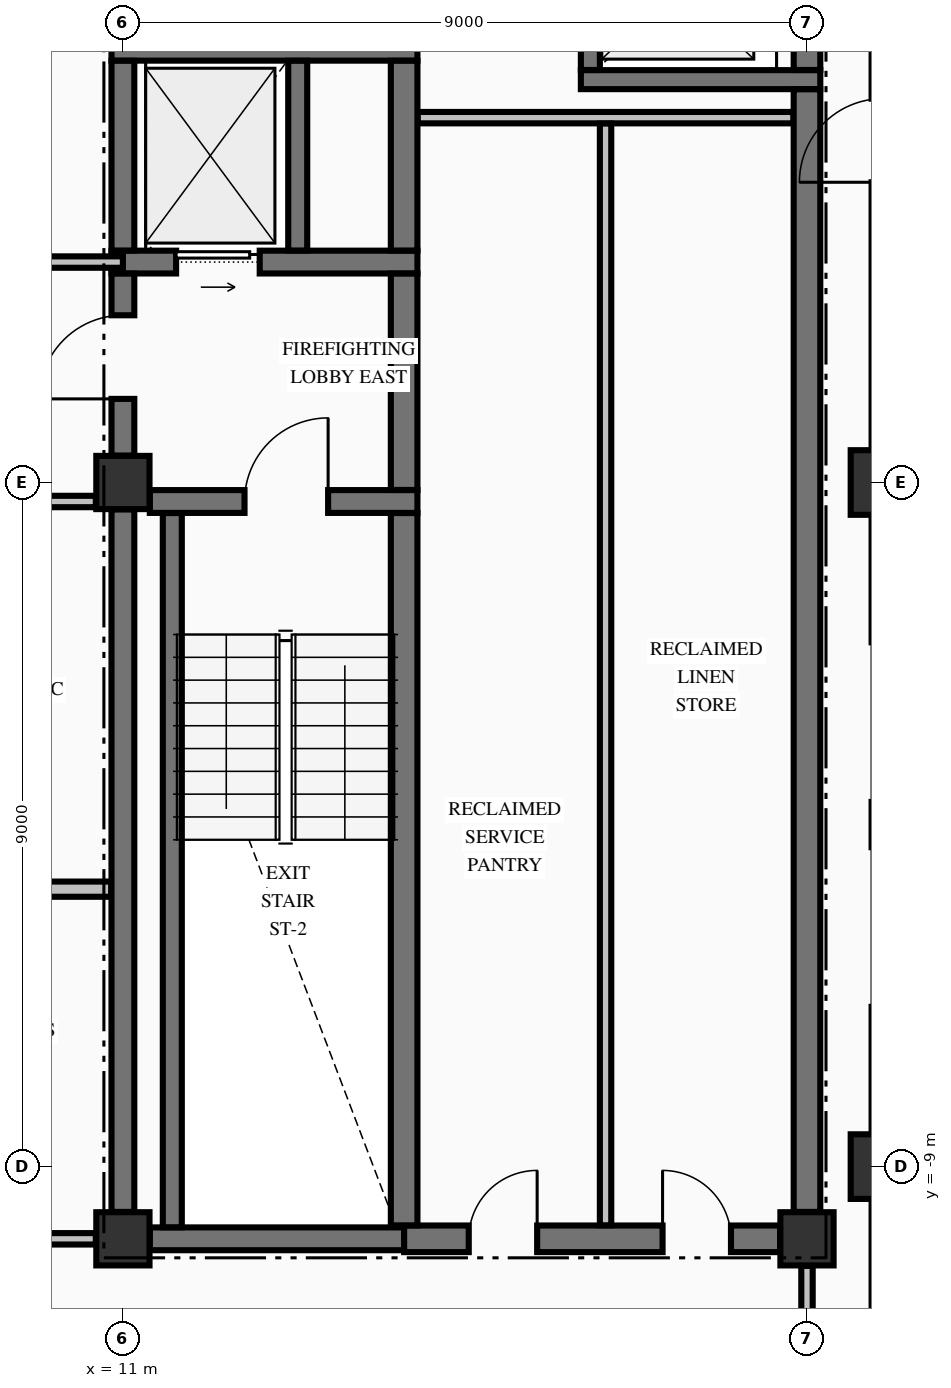
"""IFC4 building model, lengths in metres.
Left out: names, types, materials, properties, quantities, classifications, styles, units other than length and angle.
Written with IfcOpenShell. Run it as: python <this file> out.ifc"""

import sys

from ifc_helpers import new_model, si_unit, direction, frame, frame_2d, origin, origin_2d, place, context, subcontext, project, spatial, rectangle, extrude, element, fill, save


model = new_model("IFC4")
c1 = context("Model", 3, precision=1e-05, world=origin(), true_north=direction((0.0, 1.0)))
c2 = subcontext(c1, "Body", "Model", "MODEL_VIEW")
j1 = project(units=[si_unit("LENGTHUNIT", "METRE"), si_unit("PLANEANGLEUNIT", "RADIAN")], contexts=[c1])
p1 = place(None, origin())
s1 = spatial("IfcSite", under=j1, at=p1, CompositionType="ELEMENT")
p2 = place(p1, origin())
s2 = spatial("IfcBuilding", under=s1, at=p2, CompositionType="ELEMENT")
p3 = place(p2, frame((0.0, 0.0, 254.43)))
s3 = spatial("IfcBuildingStorey", under=s2, at=p3, CompositionType="ELEMENT", Elevation=254.43)
for number, where, z_axis, x_axis in (
    (1, (21.0, -9.0, -0.425), (0.0, 0.0, 1.0), (1.0, 0.0, 0.0)),
    (2, (21.0, 0.0, -0.425), (0.0, 0.0, 1.0), (1.0, 0.0, 0.0)),
):
    element("IfcColumn", number, at=place(p3, frame(where, z_axis=z_axis, x_axis=x_axis)), inside=s3, PredefinedType="COLUMN", context=c2, shape_type="SweptSolid", body=[
        extrude(rectangle(XDim=0.85, YDim=0.85, at=origin_2d()), origin(), (0.0, 0.0, 1.0), 3.405),
    ])
for number, where, z_axis, x_axis in (
    (3, (11.0, -9.95, -0.425), (0.0, 0.0, 1.0), (1.0, 0.0, 0.0)),
    (4, (11.0, 0.0, -0.425), (0.0, 0.0, 1.0), (1.0, 0.0, 0.0)),
    (5, (20.0, -9.95, -0.425), (0.0, 0.0, 1.0), (1.0, 0.0, 0.0)),
):
    element("IfcColumn", number, at=place(p3, frame(where, z_axis=z_axis, x_axis=x_axis)), inside=s3, PredefinedType="COLUMN", context=c2, shape_type="SweptSolid", body=[
        extrude(rectangle(XDim=0.7, YDim=0.7, at=origin_2d()), origin(), (0.0, 0.0, 1.0), 3.405),
    ])
p4 = place(p3, frame((21.0, -17.545, 0.0), z_axis=(0.0, 0.0, 1.0), x_axis=(0.0, 1.0, 0.0)))
e6 = element("IfcWall", 6, at=p4, inside=s3, PredefinedType="STANDARD", context=c2, shape_type="SweptSolid", body=[
    extrude(rectangle(XDim=8.09, YDim=0.3, at=frame_2d((4.045, 0.0))), origin(), (0.0, 0.0, 1.0), 2.372),
])
p5 = place(p3, frame((21.0, -8.545, 0.0), z_axis=(0.0, 0.0, 1.0), x_axis=(0.0, 1.0, 0.0)))
e7 = element("IfcWall", 7, at=p5, inside=s3, PredefinedType="STANDARD", context=c2, shape_type="SweptSolid", body=[
    extrude(rectangle(XDim=8.09, YDim=0.3, at=frame_2d((4.045, 0.0))), origin(), (0.0, 0.0, 1.0), 2.372),
])
p6 = place(p5, frame((1.647, 0.0, 0.7)))
e8 = element("IfcOpeningElement", 8, at=p6, cuts=e7, PredefinedType="OPENING", context=c2, shape_type="SweptSolid", body=[
    extrude(rectangle(XDim=2.1, YDim=1.5, at=frame_2d((1.05, 0.75))), frame((0.0, 0.16, 0.0), z_axis=(0.0, -1.0, 0.0), x_axis=(1.0, 0.0, 0.0)), (0.0, 0.0, 1.0), 0.32),
])
p7 = place(p5, frame((4.343, 0.0, 0.7)))
e9 = element("IfcOpeningElement", 9, at=p7, cuts=e7, PredefinedType="OPENING", context=c2, shape_type="SweptSolid", body=[
    extrude(rectangle(XDim=2.1, YDim=1.5, at=frame_2d((1.05, 0.75))), frame((0.0, 0.16, 0.0), z_axis=(0.0, -1.0, 0.0), x_axis=(1.0, 0.0, 0.0)), (0.0, 0.0, 1.0), 0.32),
])
p8 = place(p3, frame((21.0, 0.455, 0.0), z_axis=(0.0, 0.0, 1.0), x_axis=(0.0, 1.0, 0.0)))
e10 = element("IfcWall", 10, at=p8, inside=s3, PredefinedType="STANDARD", context=c2, shape_type="SweptSolid", body=[
    extrude(rectangle(XDim=8.09, YDim=0.3, at=frame_2d((4.045, 0.0))), origin(), (0.0, 0.0, 1.0), 2.372),
])
p9 = place(p8, frame((3.495, 0.0, 0.0)))
e11 = element("IfcOpeningElement", 11, at=p9, cuts=e10, PredefinedType="OPENING", context=c2, shape_type="SweptSolid", body=[
    extrude(rectangle(XDim=1.1, YDim=2.15, at=frame_2d((0.55, 1.075))), frame((0.0, 0.16, 0.0), z_axis=(0.0, -1.0, 0.0), x_axis=(1.0, 0.0, 0.0)), (0.0, 0.0, 1.0), 0.32),
])
p10 = place(p3, frame((11.354, -9.95, 0.0), z_axis=(0.0, 0.0, 1.0), x_axis=(1.0, 0.0, 0.0)))
e12 = element("IfcWall", 12, at=p10, inside=s3, PredefinedType="SHEAR", context=c2, shape_type="SweptSolid", body=[
    extrude(rectangle(XDim=3.346, YDim=0.3, at=frame_2d((1.673, 0.0))), origin(), (0.0, 0.0, 1.0), 2.98),
])
p11 = place(p3, frame((14.7, -9.95, 0.0), z_axis=(0.0, 0.0, 1.0), x_axis=(1.0, 0.0, 0.0)))
e13 = element("IfcWall", 13, at=p11, inside=s3, PredefinedType="SHEAR", context=c2, shape_type="SweptSolid", body=[
    extrude(rectangle(XDim=4.946, YDim=0.35, at=frame_2d((2.473, 0.0))), origin(), (0.0, 0.0, 1.0), 2.98),
])
p12 = place(p11, frame((0.85, 0.0, 0.0)))
e14 = element("IfcOpeningElement", 14, at=p12, cuts=e13, PredefinedType="OPENING", context=c2, shape_type="SweptSolid", body=[
    extrude(rectangle(XDim=0.9, YDim=2.15, at=frame_2d((0.45, 1.075))), frame((0.0, 0.185, 0.0), z_axis=(0.0, -1.0, 0.0), x_axis=(1.0, 0.0, 0.0)), (0.0, 0.0, 1.0), 0.37),
])
p13 = place(p11, frame((3.4, 0.0, 0.0)))
e15 = element("IfcOpeningElement", 15, at=p13, cuts=e13, PredefinedType="OPENING", context=c2, shape_type="SweptSolid", body=[
    extrude(rectangle(XDim=0.9, YDim=2.15, at=frame_2d((0.45, 1.075))), frame((0.0, 0.185, 0.0), z_axis=(0.0, -1.0, 0.0), x_axis=(1.0, 0.0, 0.0)), (0.0, 0.0, 1.0), 0.37),
])
p14 = place(p3, frame((11.354, -0.25, 0.0), z_axis=(0.0, 0.0, 1.0), x_axis=(1.0, 0.0, 0.0)))
e16 = element("IfcWall", 16, at=p14, inside=s3, PredefinedType="SHEAR", context=c2, shape_type="SweptSolid", body=[
    extrude(rectangle(XDim=3.521, YDim=0.3, at=frame_2d((1.76, 0.0))), origin(), (0.0, 0.0, 1.0), 2.98),
])
p15 = place(p14, frame((1.246, 0.0, 0.0)))
e17 = element("IfcOpeningElement", 17, at=p15, cuts=e16, PredefinedType="OPENING", context=c2, shape_type="SweptSolid", body=[
    extrude(rectangle(XDim=1.1, YDim=2.15, at=frame_2d((0.55, 1.075))), frame((0.0, 0.16, 0.0), z_axis=(0.0, -1.0, 0.0), x_axis=(1.0, 0.0, 0.0)), (0.0, 0.0, 1.0), 0.32),
])
p16 = place(p3, frame((10.85, 2.9, 0.0), z_axis=(0.0, 0.0, 1.0), x_axis=(1.0, 0.0, 0.0)))
e18 = element("IfcWall", 18, at=p16, inside=s3, PredefinedType="SHEAR", context=c2, shape_type="SweptSolid", body=[
    extrude(rectangle(XDim=4.025, YDim=0.3, at=frame_2d((2.012, 0.0))), origin(), (0.0, 0.0, 1.0), 2.98),
])
p17 = place(p16, frame((0.85, 0.0, 0.0)))
e19 = element("IfcOpeningElement", 19, at=p17, cuts=e18, PredefinedType="OPENING", context=c2, shape_type="SweptSolid", body=[
    extrude(rectangle(XDim=1.1, YDim=2.2, at=frame_2d((0.55, 1.1))), frame((0.0, 0.16, 0.0), z_axis=(0.0, -1.0, 0.0), x_axis=(1.0, 0.0, 0.0)), (0.0, 0.0, 1.0), 0.32),
])
p18 = place(p3, frame((17.025, 5.3, 0.0), z_axis=(0.0, 0.0, 1.0), x_axis=(1.0, 0.0, 0.0)))
e20 = element("IfcWall", 20, at=p18, inside=s3, PredefinedType="SOLIDWALL", context=c2, shape_type="SweptSolid", body=[
    extrude(rectangle(XDim=3.15, YDim=0.25, at=frame_2d((1.575, 0.0))), origin(), (0.0, 0.0, 1.0), 2.98),
])
p19 = place(p3, frame((10.85, 5.7, 0.0), z_axis=(0.0, 0.0, 1.0), x_axis=(1.0, 0.0, 0.0)))
e21 = element("IfcWall", 21, at=p19, inside=s3, PredefinedType="SHEAR", context=c2, shape_type="SweptSolid", body=[
    extrude(rectangle(XDim=4.025, YDim=0.3, at=frame_2d((2.012, 0.0))), origin(), (0.0, 0.0, 1.0), 2.98),
])
p20 = place(p3, frame((-10.644, -9.95, 0.0), z_axis=(0.0, 0.0, 1.0), x_axis=(1.0, 0.0, 0.0)))
e22 = element("IfcWall", 22, at=p20, inside=s3, PredefinedType="PARTITIONING", context=c2, shape_type="SweptSolid", body=[
    extrude(rectangle(XDim=21.288, YDim=0.15, at=frame_2d((10.644, 0.0))), origin(), (0.0, 0.0, 1.0), 2.98),
])
p21 = place(p20, frame((7.344, 0.0, 0.0)))
e23 = element("IfcOpeningElement", 23, at=p21, cuts=e22, PredefinedType="OPENING", context=c2, shape_type="SweptSolid", body=[
    extrude(rectangle(XDim=1.1, YDim=2.15, at=frame_2d((0.55, 1.075))), frame((0.0, 0.085, 0.0), z_axis=(0.0, -1.0, 0.0), x_axis=(1.0, 0.0, 0.0)), (0.0, 0.0, 1.0), 0.17),
])
p22 = place(p20, frame((13.769, 0.0, 0.0)))
e24 = element("IfcOpeningElement", 24, at=p22, cuts=e22, PredefinedType="OPENING", context=c2, shape_type="SweptSolid", body=[
    extrude(rectangle(XDim=0.95, YDim=2.15, at=frame_2d((0.475, 1.075))), frame((0.0, 0.085, 0.0), z_axis=(0.0, -1.0, 0.0), x_axis=(1.0, 0.0, 0.0)), (0.0, 0.0, 1.0), 0.17),
])
p23 = place(p20, frame((17.994, 0.0, 0.0)))
e25 = element("IfcOpeningElement", 25, at=p23, cuts=e22, PredefinedType="OPENING", context=c2, shape_type="SweptSolid", body=[
    extrude(rectangle(XDim=0.9, YDim=2.15, at=frame_2d((0.45, 1.075))), frame((0.0, 0.085, 0.0), z_axis=(0.0, -1.0, 0.0), x_axis=(1.0, 0.0, 0.0)), (0.0, 0.0, 1.0), 0.17),
])
p24 = place(p3, frame((-1.725, -5.35, 0.0), z_axis=(0.0, 0.0, 1.0), x_axis=(1.0, 0.0, 0.0)))
e26 = element("IfcWall", 26, at=p24, inside=s3, PredefinedType="PARTITIONING", context=c2, shape_type="SweptSolid", body=[
    extrude(rectangle(XDim=12.572, YDim=0.2, at=frame_2d((6.286, 0.0))), origin(), (0.0, 0.0, 1.0), 2.98),
])
p25 = place(p3, frame((-10.644, -0.25, 0.0), z_axis=(0.0, 0.0, 1.0), x_axis=(1.0, 0.0, 0.0)))
e27 = element("IfcWall", 27, at=p25, inside=s3, PredefinedType="PARTITIONING", context=c2, shape_type="SweptSolid", body=[
    extrude(rectangle(XDim=21.288, YDim=0.15, at=frame_2d((10.644, 0.0))), origin(), (0.0, 0.0, 1.0), 2.98),
])
p26 = place(p25, frame((7.344, 0.0, 0.0)))
e28 = element("IfcOpeningElement", 28, at=p26, cuts=e27, PredefinedType="OPENING", context=c2, shape_type="SweptSolid", body=[
    extrude(rectangle(XDim=1.1, YDim=2.15, at=frame_2d((0.55, 1.075))), frame((0.0, 0.085, 0.0), z_axis=(0.0, -1.0, 0.0), x_axis=(1.0, 0.0, 0.0)), (0.0, 0.0, 1.0), 0.17),
])
p27 = place(p25, frame((2.699, 0.0, 0.0)))
e29 = element("IfcOpeningElement", 29, at=p27, cuts=e27, PredefinedType="OPENING", context=c2, shape_type="SweptSolid", body=[
    extrude(rectangle(XDim=1.05, YDim=2.15, at=frame_2d((0.525, 1.075))), frame((0.0, 0.085, 0.0), z_axis=(0.0, -1.0, 0.0), x_axis=(1.0, 0.0, 0.0)), (0.0, 0.0, 1.0), 0.17),
])
p28 = place(p25, frame((14.839, 0.0, 0.0)))
e30 = element("IfcOpeningElement", 30, at=p28, cuts=e27, PredefinedType="OPENING", context=c2, shape_type="SweptSolid", body=[
    extrude(rectangle(XDim=0.95, YDim=2.15, at=frame_2d((0.475, 1.075))), frame((0.0, 0.085, 0.0), z_axis=(0.0, -1.0, 0.0), x_axis=(1.0, 0.0, 0.0)), (0.0, 0.0, 1.0), 0.17),
])
p29 = place(p3, frame((-11.0, 2.9, 0.0), z_axis=(0.0, 0.0, 1.0), x_axis=(1.0, 0.0, 0.0)))
e31 = element("IfcWall", 31, at=p29, inside=s3, PredefinedType="PARTITIONING", context=c2, shape_type="SweptSolid", body=[
    extrude(rectangle(XDim=22.0, YDim=0.15, at=frame_2d((11.0, 0.0))), origin(), (0.0, 0.0, 1.0), 2.98),
])
p30 = place(p29, frame((7.7, 0.0, 0.0)))
e32 = element("IfcOpeningElement", 32, at=p30, cuts=e31, PredefinedType="OPENING", context=c2, shape_type="SweptSolid", body=[
    extrude(rectangle(XDim=1.1, YDim=2.15, at=frame_2d((0.55, 1.075))), frame((0.0, 0.085, 0.0), z_axis=(0.0, -1.0, 0.0), x_axis=(1.0, 0.0, 0.0)), (0.0, 0.0, 1.0), 0.17),
])
p31 = place(p29, frame((3.055, 0.0, 0.0)))
e33 = element("IfcOpeningElement", 33, at=p31, cuts=e31, PredefinedType="OPENING", context=c2, shape_type="SweptSolid", body=[
    extrude(rectangle(XDim=1.05, YDim=2.15, at=frame_2d((0.525, 1.075))), frame((0.0, 0.085, 0.0), z_axis=(0.0, -1.0, 0.0), x_axis=(1.0, 0.0, 0.0)), (0.0, 0.0, 1.0), 0.17),
])
p32 = place(p29, frame((11.475, 0.0, 0.0)))
e34 = element("IfcOpeningElement", 34, at=p32, cuts=e31, PredefinedType="OPENING", context=c2, shape_type="SweptSolid", body=[
    extrude(rectangle(XDim=0.95, YDim=2.15, at=frame_2d((0.475, 1.075))), frame((0.0, 0.085, 0.0), z_axis=(0.0, -1.0, 0.0), x_axis=(1.0, 0.0, 0.0)), (0.0, 0.0, 1.0), 0.17),
])
p33 = place(p29, frame((17.795, 0.0, 0.0)))
e35 = element("IfcOpeningElement", 35, at=p33, cuts=e31, PredefinedType="OPENING", context=c2, shape_type="SweptSolid", body=[
    extrude(rectangle(XDim=0.95, YDim=2.15, at=frame_2d((0.475, 1.075))), frame((0.0, 0.085, 0.0), z_axis=(0.0, -1.0, 0.0), x_axis=(1.0, 0.0, 0.0)), (0.0, 0.0, 1.0), 0.17),
])
p34 = place(p3, frame((14.878, 4.8, 0.0), z_axis=(0.0, 0.0, 1.0), x_axis=(1.0, 0.0, 0.0)))
e36 = element("IfcWall", 36, at=p34, inside=s3, PredefinedType="PARTITIONING", context=c2, shape_type="SweptSolid", body=[
    extrude(rectangle(XDim=4.944, YDim=0.15, at=frame_2d((2.472, 0.0))), origin(), (0.0, 0.0, 1.0), 2.98),
])
p35 = place(p3, frame((11.0, -9.596, 0.0), z_axis=(0.0, 0.0, 1.0), x_axis=(0.0, 1.0, 0.0)))
e37 = element("IfcWall", 37, at=p35, inside=s3, PredefinedType="SHEAR", context=c2, shape_type="SweptSolid", body=[
    extrude(rectangle(XDim=9.242, YDim=0.3, at=frame_2d((4.621, 0.0))), origin(), (0.0, 0.0, 1.0), 2.98),
])
p36 = place(p3, frame((11.0, 0.354, 0.0), z_axis=(0.0, 0.0, 1.0), x_axis=(0.0, 1.0, 0.0)))
e38 = element("IfcWall", 38, at=p36, inside=s3, PredefinedType="SHEAR", context=c2, shape_type="SweptSolid", body=[
    extrude(rectangle(XDim=2.394, YDim=0.3, at=frame_2d((1.197, 0.0))), origin(), (0.0, 0.0, 1.0), 2.98),
])
p37 = place(p36, frame((0.746, 0.0, 0.0)))
e39 = element("IfcOpeningElement", 39, at=p37, cuts=e38, PredefinedType="OPENING", context=c2, shape_type="SweptSolid", body=[
    extrude(rectangle(XDim=1.1, YDim=2.15, at=frame_2d((0.55, 1.075))), frame((0.0, 0.16, 0.0), z_axis=(0.0, -1.0, 0.0), x_axis=(1.0, 0.0, 0.0)), (0.0, 0.0, 1.0), 0.32),
])
p38 = place(p3, frame((11.0, 3.052, 0.0), z_axis=(0.0, 0.0, 1.0), x_axis=(0.0, 1.0, 0.0)))
e40 = element("IfcWall", 40, at=p38, inside=s3, PredefinedType="SHEAR", context=c2, shape_type="SweptSolid", body=[
    extrude(rectangle(XDim=2.496, YDim=0.3, at=frame_2d((1.248, 0.0))), origin(), (0.0, 0.0, 1.0), 2.98),
])
p39 = place(p3, frame((11.65, -9.798, 0.0), z_axis=(0.0, 0.0, 1.0), x_axis=(0.0, 1.0, 0.0)))
e41 = element("IfcWall", 41, at=p39, inside=s3, PredefinedType="SOLIDWALL", context=c2, shape_type="SweptSolid", body=[
    extrude(rectangle(XDim=9.396, YDim=0.25, at=frame_2d((4.698, 0.0))), origin(), (0.0, 0.0, 1.0), 2.98),
])
p40 = place(p3, frame((13.3, 3.052, 0.0), z_axis=(0.0, 0.0, 1.0), x_axis=(0.0, 1.0, 0.0)))
e42 = element("IfcWall", 42, at=p40, inside=s3, PredefinedType="SOLIDWALL", context=c2, shape_type="SweptSolid", body=[
    extrude(rectangle(XDim=2.496, YDim=0.25, at=frame_2d((1.248, 0.0))), origin(), (0.0, 0.0, 1.0), 2.98),
])
p41 = place(p3, frame((14.7, -9.773, 0.0), z_axis=(0.0, 0.0, 1.0), x_axis=(0.0, 1.0, 0.0)))
e43 = element("IfcWall", 43, at=p41, inside=s3, PredefinedType="SHEAR", context=c2, shape_type="SweptSolid", body=[
    extrude(rectangle(XDim=9.371, YDim=0.35, at=frame_2d((4.686, 0.0))), origin(), (0.0, 0.0, 1.0), 2.98),
])
p42 = place(p3, frame((14.7, -0.098, 0.0), z_axis=(0.0, 0.0, 1.0), x_axis=(0.0, 1.0, 0.0)))
e44 = element("IfcWall", 44, at=p42, inside=s3, PredefinedType="SHEAR", context=c2, shape_type="SweptSolid", body=[
    extrude(rectangle(XDim=2.846, YDim=0.35, at=frame_2d((1.423, 0.0))), origin(), (0.0, 0.0, 1.0), 2.98),
])
p43 = place(p3, frame((14.7, 3.052, 0.0), z_axis=(0.0, 0.0, 1.0), x_axis=(0.0, 1.0, 0.0)))
e45 = element("IfcWall", 45, at=p43, inside=s3, PredefinedType="SHEAR", context=c2, shape_type="SweptSolid", body=[
    extrude(rectangle(XDim=2.496, YDim=0.35, at=frame_2d((1.248, 0.0))), origin(), (0.0, 0.0, 1.0), 2.98),
])
p44 = place(p3, frame((17.15, 5.427, 0.0), z_axis=(0.0, 0.0, 1.0), x_axis=(0.0, 1.0, 0.0)))
e46 = element("IfcWall", 46, at=p44, inside=s3, PredefinedType="SOLIDWALL", context=c2, shape_type="SweptSolid", body=[
    extrude(rectangle(XDim=2.196, YDim=0.25, at=frame_2d((1.098, 0.0))), origin(), (0.0, 0.0, 1.0), 2.98),
])
p45 = place(p44, frame((0.548, 0.0, 0.0)))
e47 = element("IfcOpeningElement", 47, at=p45, cuts=e46, PredefinedType="OPENING", context=c2, shape_type="SweptSolid", body=[
    extrude(rectangle(XDim=1.1, YDim=2.2, at=frame_2d((0.55, 1.1))), frame((0.0, 0.135, 0.0), z_axis=(0.0, -1.0, 0.0), x_axis=(1.0, 0.0, 0.0)), (0.0, 0.0, 1.0), 0.27),
])
p46 = place(p3, frame((20.0, -9.596, 0.0), z_axis=(0.0, 0.0, 1.0), x_axis=(0.0, 1.0, 0.0)))
e48 = element("IfcWall", 48, at=p46, inside=s3, PredefinedType="SHEAR", context=c2, shape_type="SweptSolid", body=[
    extrude(rectangle(XDim=14.769, YDim=0.35, at=frame_2d((7.385, 0.0))), origin(), (0.0, 0.0, 1.0), 2.98),
])
p47 = place(p3, frame((20.0, 5.427, 0.0), z_axis=(0.0, 0.0, 1.0), x_axis=(0.0, 1.0, 0.0)))
e49 = element("IfcWall", 49, at=p47, inside=s3, PredefinedType="SHEAR", context=c2, shape_type="SweptSolid", body=[
    extrude(rectangle(XDim=2.196, YDim=0.35, at=frame_2d((1.098, 0.0))), origin(), (0.0, 0.0, 1.0), 2.98),
])
p48 = place(p3, frame((17.35, -9.772, 0.0), z_axis=(0.0, 0.0, 1.0), x_axis=(0.0, 1.0, 0.0)))
e50 = element("IfcWall", 50, at=p48, inside=s3, PredefinedType="PARTITIONING", context=c2, shape_type="SweptSolid", body=[
    extrude(rectangle(XDim=14.494, YDim=0.15, at=frame_2d((7.247, 0.0))), origin(), (0.0, 0.0, 1.0), 2.98),
])
p49 = place(p3, frame((20.0, -12.122, 0.0), z_axis=(0.0, 0.0, 1.0), x_axis=(0.0, 1.0, 0.0)))
e51 = element("IfcWall", 51, at=p49, inside=s3, PredefinedType="PARTITIONING", context=c2, shape_type="SweptSolid", body=[
    extrude(rectangle(XDim=1.816, YDim=0.15, at=frame_2d((0.908, 0.0))), origin(), (0.0, 0.0, 1.0), 2.57),
])
p50 = place(p15, origin())
e52 = element("IfcDoor", 52, at=p50, inside=s3, OperationType="SINGLE_SWING_RIGHT", PredefinedType="DOOR", context=c2, shape_type="SweptSolid", body=[
    extrude(rectangle(XDim=1.1, YDim=2.15, at=frame_2d((0.55, 1.075))), frame((0.0, 0.025, 0.0), z_axis=(0.0, -1.0, 0.0), x_axis=(1.0, 0.0, 0.0)), (0.0, 0.0, 1.0), 0.05),
])
fill(e17, e52)
p51 = place(p37, origin())
e53 = element("IfcDoor", 53, at=p51, inside=s3, OperationType="SINGLE_SWING_LEFT", PredefinedType="DOOR", context=c2, shape_type="SweptSolid", body=[
    extrude(rectangle(XDim=1.1, YDim=2.15, at=frame_2d((0.55, 1.075))), frame((0.0, 0.025, 0.0), z_axis=(0.0, -1.0, 0.0), x_axis=(1.0, 0.0, 0.0)), (0.0, 0.0, 1.0), 0.05),
])
fill(e39, e53)
p52 = place(p17, origin())
e54 = element("IfcDoor", 54, at=p52, inside=s3, OperationType="SLIDING_TO_RIGHT", PredefinedType="DOOR", context=c2, shape_type="SweptSolid", body=[
    extrude(rectangle(XDim=1.1, YDim=2.2, at=frame_2d((0.55, 1.1))), frame((0.0, 0.025, 0.0), z_axis=(0.0, -1.0, 0.0), x_axis=(1.0, 0.0, 0.0)), (0.0, 0.0, 1.0), 0.05),
])
fill(e19, e54)
p53 = place(p12, origin())
e55 = element("IfcDoor", 55, at=p53, inside=s3, OperationType="SINGLE_SWING_RIGHT", PredefinedType="DOOR", context=c2, shape_type="SweptSolid", body=[
    extrude(rectangle(XDim=0.9, YDim=2.15, at=frame_2d((0.45, 1.075))), frame((0.0, 0.025, 0.0), z_axis=(0.0, -1.0, 0.0), x_axis=(1.0, 0.0, 0.0)), (0.0, 0.0, 1.0), 0.05),
])
fill(e14, e55)
p54 = place(p13, origin())
e56 = element("IfcDoor", 56, at=p54, inside=s3, OperationType="SINGLE_SWING_LEFT", PredefinedType="DOOR", context=c2, shape_type="SweptSolid", body=[
    extrude(rectangle(XDim=0.9, YDim=2.15, at=frame_2d((0.45, 1.075))), frame((0.0, 0.025, 0.0), z_axis=(0.0, -1.0, 0.0), x_axis=(1.0, 0.0, 0.0)), (0.0, 0.0, 1.0), 0.05),
])
fill(e15, e56)
save(model, sys.argv[1])
